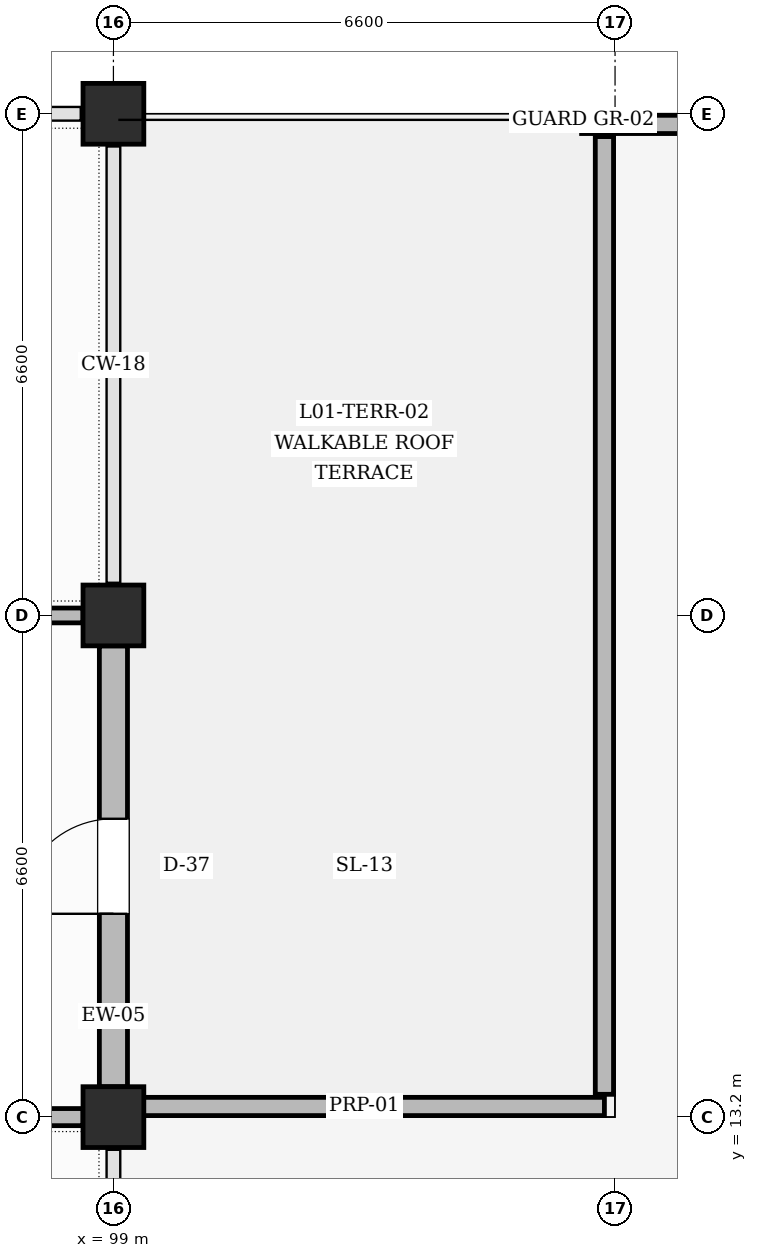
"""IFC4 building model, lengths in metres.
Left out: names, types, materials, properties, quantities, classifications, styles, units other than length and angle.
Written with IfcOpenShell. Run it as: python <this file> out.ifc"""

import sys

from ifc_helpers import new_model, si_unit, direction, frame, frame_2d, origin, origin_2d, place, context, subcontext, project, spatial, rectangle, extrude, element, fill, save


model = new_model("IFC4")
c1 = context("Model", 3, precision=1e-05, world=origin(), true_north=direction((0.0, 1.0)))
c2 = subcontext(c1, "Body", "Model", "MODEL_VIEW")
j1 = project(units=[si_unit("LENGTHUNIT", "METRE"), si_unit("PLANEANGLEUNIT", "RADIAN")], contexts=[c1])
p1 = place(None, origin())
s1 = spatial("IfcSite", under=j1, at=p1, CompositionType="ELEMENT")
p2 = place(p1, origin())
s2 = spatial("IfcBuilding", under=s1, at=p2, CompositionType="ELEMENT")
p3 = place(p2, frame((0.0, 0.0, 5.4)))
s3 = spatial("IfcBuildingStorey", under=s2, at=p3, CompositionType="ELEMENT", Elevation=5.4)
for number, where, z_axis, x_axis in (
    (1, (99.0, 13.2, 0.0), (0.0, 0.0, 1.0), (1.0, 0.0, 0.0)),
    (2, (99.0, 19.8, 0.0), (0.0, 0.0, 1.0), (1.0, 0.0, 0.0)),
    (3, (99.0, 26.4, 0.0), (0.0, 0.0, 1.0), (1.0, 0.0, 0.0)),
):
    element("IfcColumn", number, at=place(p3, frame(where, z_axis=z_axis, x_axis=x_axis)), inside=s3, PredefinedType="COLUMN", context=c2, shape_type="SweptSolid", body=[
        extrude(rectangle(XDim=0.8, YDim=0.8, at=origin_2d()), origin(), (0.0, 0.0, 1.0), 4.8),
    ])
p4 = place(p3, frame((99.0, 13.6, 0.0), z_axis=(0.0, 0.0, 1.0), x_axis=(0.0, 1.0, 0.0)))
e4 = element("IfcWall", 4, at=p4, inside=s3, PredefinedType="SOLIDWALL", context=c2, shape_type="SweptSolid", body=[
    extrude(rectangle(XDim=5.8, YDim=0.37, at=frame_2d((2.9, 0.0))), origin(), (0.0, 0.0, 1.0), 3.85),
])
p5 = place(p4, frame((2.275, 0.0, 0.0)))
e5 = element("IfcOpeningElement", 5, at=p5, cuts=e4, PredefinedType="OPENING", context=c2, shape_type="SweptSolid", body=[
    extrude(rectangle(XDim=1.25, YDim=2.2, at=frame_2d((0.625, 1.1))), frame((0.0, 0.195, 0.0), z_axis=(0.0, -1.0, 0.0), x_axis=(1.0, 0.0, 0.0)), (0.0, 0.0, 1.0), 0.39),
])
p6 = place(p3, frame((99.14, 13.34, 0.0), z_axis=(0.0, 0.0, 1.0), x_axis=(1.0, 0.0, 0.0)))
e6 = element("IfcWall", 6, at=p6, inside=s3, PredefinedType="PARAPET", context=c2, shape_type="SweptSolid", body=[
    extrude(rectangle(XDim=6.32, YDim=0.24, at=frame_2d((3.16, 0.0))), origin(), (0.0, 0.0, 1.0), 1.15),
])
for number, where, z_axis, x_axis in (
    (7, (105.46, 13.5, 0.0), (0.0, 0.0, 1.0), (0.0, 1.0, 0.0)),
    (8, (105.46, 20.1, 0.0), (0.0, 0.0, 1.0), (0.0, 1.0, 0.0)),
):
    element("IfcWall", number, at=place(p3, frame(where, z_axis=z_axis, x_axis=x_axis)), inside=s3, PredefinedType="PARAPET", context=c2, shape_type="SweptSolid", body=[
        extrude(rectangle(XDim=6.0, YDim=0.24, at=frame_2d((3.0, 0.0))), origin(), (0.0, 0.0, 1.0), 1.15),
    ])
p7 = place(p3, frame((105.16, 26.26, 0.0), z_axis=(0.0, 0.0, 1.0), x_axis=(1.0, 0.0, 0.0)))
e9 = element("IfcWall", 9, at=p7, inside=s3, PredefinedType="PARAPET", context=c2, shape_type="SweptSolid", body=[
    extrude(rectangle(XDim=0.16, YDim=0.24, at=frame_2d((0.08, 0.0))), origin(), (0.0, 0.0, 1.0), 1.15),
])
p8 = place(p3, frame((105.74, 26.26, 0.0), z_axis=(0.0, 0.0, 1.0), x_axis=(1.0, 0.0, 0.0)))
e10 = element("IfcWall", 10, at=p8, inside=s3, PredefinedType="PARAPET", context=c2, shape_type="SweptSolid", body=[
    extrude(rectangle(XDim=6.32, YDim=0.24, at=frame_2d((3.16, 0.0))), origin(), (0.0, 0.0, 1.0), 1.15),
])
p9 = place(p3, frame((92.7, 13.2, 0.0), z_axis=(0.0, 0.0, 1.0), x_axis=(1.0, 0.0, 0.0)))
e11 = element("IfcWall", 11, at=p9, inside=s3, PredefinedType="PARTITIONING", context=c2, shape_type="SweptSolid", body=[
    extrude(rectangle(XDim=5.9, YDim=0.225, at=frame_2d((2.95, 0.0))), origin(), (0.0, 0.0, 1.0), 3.6),
])
p10 = place(p9, frame((2.35, 0.0, 0.0)))
e12 = element("IfcOpeningElement", 12, at=p10, cuts=e11, PredefinedType="OPENING", context=c2, shape_type="SweptSolid", body=[
    extrude(rectangle(XDim=1.3, YDim=2.3, at=frame_2d((0.65, 1.15))), frame((0.0, 0.123, 0.0), z_axis=(0.0, -1.0, 0.0), x_axis=(1.0, 0.0, 0.0)), (0.0, 0.0, 1.0), 0.245),
])
p11 = place(p3, frame((92.7, 19.8, 0.0), z_axis=(0.0, 0.0, 1.0), x_axis=(1.0, 0.0, 0.0)))
e13 = element("IfcWall", 13, at=p11, inside=s3, PredefinedType="PARTITIONING", context=c2, shape_type="SweptSolid", body=[
    extrude(rectangle(XDim=5.9, YDim=0.195, at=frame_2d((2.95, 0.0))), origin(), (0.0, 0.0, 1.0), 3.7),
])
p12 = place(p11, frame((2.51, 0.0, 0.0)))
e14 = element("IfcOpeningElement", 14, at=p12, cuts=e13, PredefinedType="OPENING", context=c2, shape_type="SweptSolid", body=[
    extrude(rectangle(XDim=0.98, YDim=2.15, at=frame_2d((0.49, 1.075))), frame((0.0, 0.107, 0.0), z_axis=(0.0, -1.0, 0.0), x_axis=(1.0, 0.0, 0.0)), (0.0, 0.0, 1.0), 0.215),
])
p13 = place(p5, origin())
e15 = element("IfcDoor", 15, at=p13, inside=s3, OperationType="SINGLE_SWING_LEFT", PredefinedType="DOOR", context=c2, shape_type="SweptSolid", body=[
    extrude(rectangle(XDim=1.25, YDim=2.2, at=frame_2d((0.625, 1.1))), frame((0.0, 0.025, 0.0), z_axis=(0.0, -1.0, 0.0), x_axis=(1.0, 0.0, 0.0)), (0.0, 0.0, 1.0), 0.05),
])
fill(e5, e15)
save(model, sys.argv[1])
